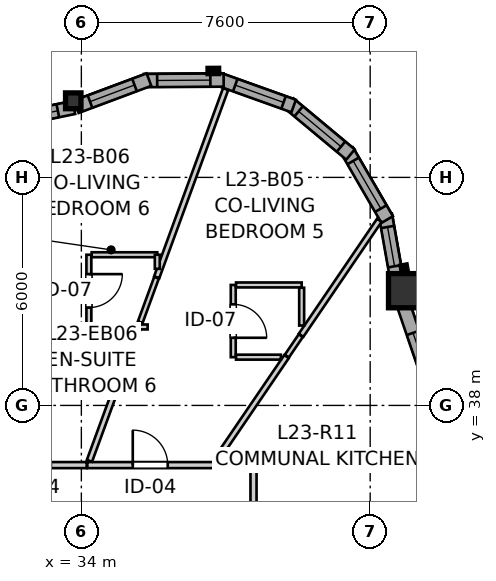
"""IFC4 building model, lengths in metres.
Left out: names, types, materials, properties, quantities, classifications, styles, units other than length and angle.
Written with IfcOpenShell. Run it as: python <this file> out.ifc"""

import sys

from ifc_helpers import new_model, si_unit, direction, frame, frame_2d, origin, origin_2d, place, context, subcontext, project, spatial, rectangle, i_section, extrude, source, transform, mapped, element, fill, save


model = new_model("IFC4")
c1 = context("Model", 3, precision=1e-05, world=origin(), true_north=direction((0.0, 1.0)))
c2 = subcontext(c1, "Body", "Model", "MODEL_VIEW")
j1 = project(units=[si_unit("LENGTHUNIT", "METRE"), si_unit("PLANEANGLEUNIT", "RADIAN")], contexts=[c1])
p1 = place(None, origin())
s1 = spatial("IfcSite", under=j1, at=p1, CompositionType="ELEMENT")
p2 = place(p1, origin())
s2 = spatial("IfcBuilding", under=s1, at=p2, CompositionType="ELEMENT")
p3 = place(p2, frame((0.0, 0.0, 80.0)))
s3 = spatial("IfcBuildingStorey", under=s2, at=p3, CompositionType="ELEMENT", Elevation=80.0)
m1 = source(origin(), c2, "Body", "SweptSolid", [
    extrude(rectangle(XDim=0.9, YDim=0.9, at=origin_2d()), origin(), (0.0, 0.0, 1.0), 2.935),
])
p4 = place(p3, frame((42.532, 41.019, 0.0), z_axis=(0.0, 0.0, 1.0), x_axis=(1.0, 0.0, 0.0)))
e1 = element("IfcColumn", 1, at=p4, inside=s3, PredefinedType="COLUMN", context=c2, shape_type="MappedRepresentation", body=[
    mapped(m1, transform((0.0, 0.0, 0.0), x_axis=(1.0, 0.0, 0.0), y_axis=(0.0, 1.0, 0.0), z_axis=(0.0, 0.0, 1.0), scale=1.0)),
])
m2 = source(origin(), c2, "Body", "SweptSolid", [
    extrude(i_section(OverallWidth=0.406, OverallDepth=0.416, WebThickness=0.027, FlangeThickness=0.044, FilletRadius=0.015, at=origin_2d()), origin(), (0.0, 0.0, 1.0), 2.935),
])
p5 = place(p3, frame((33.787, 46.015, 0.0), z_axis=(0.0, 0.0, 1.0), x_axis=(1.0, 0.0, 0.0)))
e2 = element("IfcColumn", 2, at=p5, inside=s3, PredefinedType="PILASTER", context=c2, shape_type="MappedRepresentation", body=[
    mapped(m2, transform((0.0, 0.0, 0.0), x_axis=(1.0, 0.0, 0.0), y_axis=(0.0, 1.0, 0.0), z_axis=(0.0, 0.0, 1.0), scale=1.0)),
])
p6 = place(p3, frame((43.406, 37.923, 0.0), z_axis=(0.0, 0.0, 1.0), x_axis=(-0.323597196737, 0.946194934601, 0.0)))
e3 = element("IfcWall", 3, at=p6, inside=s3, PredefinedType="SOLIDWALL", context=c2, shape_type="SweptSolid", body=[
    extrude(rectangle(XDim=2.988, YDim=0.35, at=frame_2d((1.494, 0.0))), origin(), (0.0, 0.0, 1.0), 2.465),
])
p7 = place(p6, frame((0.899, 0.0, 0.82)))
e4 = element("IfcOpeningElement", 4, at=p7, cuts=e3, PredefinedType="OPENING", context=c2, shape_type="SweptSolid", body=[
    extrude(rectangle(XDim=1.2, YDim=1.45, at=frame_2d((0.6, 0.725))), frame((0.0, 0.185, 0.0), z_axis=(0.0, -1.0, 0.0), x_axis=(1.0, 0.0, 0.0)), (0.0, 0.0, 1.0), 0.37),
])
p8 = place(p3, frame((42.321, 41.21, 0.0), z_axis=(0.0, 0.0, 1.0), x_axis=(-0.174331490339, 0.984687022092, 0.0)))
e5 = element("IfcWall", 5, at=p8, inside=s3, PredefinedType="SOLIDWALL", context=c2, shape_type="SweptSolid", body=[
    extrude(rectangle(XDim=1.836, YDim=0.35, at=frame_2d((0.918, 0.0))), origin(), (0.0, 0.0, 1.0), 2.465),
])
p9 = place(p8, frame((0.458, 0.0, 0.82)))
e6 = element("IfcOpeningElement", 6, at=p9, cuts=e5, PredefinedType="OPENING", context=c2, shape_type="SweptSolid", body=[
    extrude(rectangle(XDim=1.05, YDim=1.45, at=frame_2d((0.525, 0.725))), frame((0.0, 0.185, 0.0), z_axis=(0.0, -1.0, 0.0), x_axis=(1.0, 0.0, 0.0)), (0.0, 0.0, 1.0), 0.37),
])
p10 = place(p3, frame((42.047, 42.89, 0.0), z_axis=(0.0, 0.0, 1.0), x_axis=(-0.501902596059, 0.864924149315, 0.0)))
e7 = element("IfcWall", 7, at=p10, inside=s3, PredefinedType="SOLIDWALL", context=c2, shape_type="SweptSolid", body=[
    extrude(rectangle(XDim=2.099, YDim=0.35, at=frame_2d((1.049, 0.0))), origin(), (0.0, 0.0, 1.0), 2.465),
])
p11 = place(p10, frame((0.333, 0.0, 0.82)))
e8 = element("IfcOpeningElement", 8, at=p11, cuts=e7, PredefinedType="OPENING", context=c2, shape_type="SweptSolid", body=[
    extrude(rectangle(XDim=1.45, YDim=1.25, at=frame_2d((0.725, 0.625))), frame((0.0, 0.185, 0.0), z_axis=(0.0, -1.0, 0.0), x_axis=(1.0, 0.0, 0.0)), (0.0, 0.0, 1.0), 0.37),
])
p12 = place(p3, frame((41.082, 44.602, 0.0), z_axis=(0.0, 0.0, 1.0), x_axis=(-0.768497696041, 0.639852554249, 0.0)))
e9 = element("IfcWall", 9, at=p12, inside=s3, PredefinedType="SOLIDWALL", context=c2, shape_type="SweptSolid", body=[
    extrude(rectangle(XDim=2.099, YDim=0.35, at=frame_2d((1.049, 0.0))), origin(), (0.0, 0.0, 1.0), 2.465),
])
p13 = place(p12, frame((0.324, 0.0, 0.82)))
e10 = element("IfcOpeningElement", 10, at=p13, cuts=e9, PredefinedType="OPENING", context=c2, shape_type="SweptSolid", body=[
    extrude(rectangle(XDim=1.45, YDim=1.25, at=frame_2d((0.725, 0.625))), frame((0.0, 0.185, 0.0), z_axis=(0.0, -1.0, 0.0), x_axis=(1.0, 0.0, 0.0)), (0.0, 0.0, 1.0), 0.37),
])
p14 = place(p3, frame((39.586, 45.877, 0.0), z_axis=(0.0, 0.0, 1.0), x_axis=(-0.941473186867, 0.33708787936, 0.0)))
e11 = element("IfcWall", 11, at=p14, inside=s3, PredefinedType="SOLIDWALL", context=c2, shape_type="SweptSolid", body=[
    extrude(rectangle(XDim=2.099, YDim=0.35, at=frame_2d((1.049, 0.0))), origin(), (0.0, 0.0, 1.0), 2.465),
])
p15 = place(p14, frame((0.283, 0.0, 0.82)))
e12 = element("IfcOpeningElement", 12, at=p15, cuts=e11, PredefinedType="OPENING", context=c2, shape_type="SweptSolid", body=[
    extrude(rectangle(XDim=1.35, YDim=1.45, at=frame_2d((0.675, 0.725))), frame((0.0, 0.185, 0.0), z_axis=(0.0, -1.0, 0.0), x_axis=(1.0, 0.0, 0.0)), (0.0, 0.0, 1.0), 0.37),
])
p16 = place(p3, frame((37.744, 46.562, 0.0), z_axis=(0.0, 0.0, 1.0), x_axis=(-0.999976451414, -0.006862697526, 0.0)))
e13 = element("IfcWall", 13, at=p16, inside=s3, PredefinedType="SOLIDWALL", context=c2, shape_type="SweptSolid", body=[
    extrude(rectangle(XDim=2.099, YDim=0.35, at=frame_2d((1.049, 0.0))), origin(), (0.0, 0.0, 1.0), 2.465),
])
p17 = place(p16, frame((0.35, 0.0, 0.82)))
e14 = element("IfcOpeningElement", 14, at=p17, cuts=e13, PredefinedType="OPENING", context=c2, shape_type="SweptSolid", body=[
    extrude(rectangle(XDim=1.4, YDim=1.35, at=frame_2d((0.7, 0.675))), frame((0.0, 0.185, 0.0), z_axis=(0.0, -1.0, 0.0), x_axis=(1.0, 0.0, 0.0)), (0.0, 0.0, 1.0), 0.37),
])
p18 = place(p3, frame((35.779, 46.573, 0.0), z_axis=(0.0, 0.0, 1.0), x_axis=(-0.9368002254, -0.349864741994, 0.0)))
e15 = element("IfcWall", 15, at=p18, inside=s3, PredefinedType="SOLIDWALL", context=c2, shape_type="SweptSolid", body=[
    extrude(rectangle(XDim=2.041, YDim=0.35, at=frame_2d((1.021, 0.0))), origin(), (0.0, 0.0, 1.0), 2.465),
])
p19 = place(p18, frame((0.406, 0.0, 0.82)))
e16 = element("IfcOpeningElement", 16, at=p19, cuts=e15, PredefinedType="OPENING", context=c2, shape_type="SweptSolid", body=[
    extrude(rectangle(XDim=1.25, YDim=1.35, at=frame_2d((0.625, 0.675))), frame((0.0, 0.185, 0.0), z_axis=(0.0, -1.0, 0.0), x_axis=(1.0, 0.0, 0.0)), (0.0, 0.0, 1.0), 0.37),
])
p20 = place(p3, frame((33.803, 45.84, 0.0), z_axis=(0.0, 0.0, 1.0), x_axis=(-0.97943222174, -0.201773444777, 0.0)))
e17 = element("IfcWall", 17, at=p20, inside=s3, PredefinedType="SOLIDWALL", context=c2, shape_type="SweptSolid", body=[
    extrude(rectangle(XDim=3.144, YDim=0.35, at=frame_2d((1.572, 0.0))), origin(), (0.0, 0.0, 1.0), 2.465),
])
p21 = place(p20, frame((0.431, 0.0, 0.82)))
e18 = element("IfcOpeningElement", 18, at=p21, cuts=e17, PredefinedType="OPENING", context=c2, shape_type="SweptSolid", body=[
    extrude(rectangle(XDim=0.95, YDim=1.35, at=frame_2d((0.475, 0.675))), frame((0.0, 0.185, 0.0), z_axis=(0.0, -1.0, 0.0), x_axis=(1.0, 0.0, 0.0)), (0.0, 0.0, 1.0), 0.37),
])
p22 = place(p20, frame((1.933, 0.0, 0.82)))
e19 = element("IfcOpeningElement", 19, at=p22, cuts=e17, PredefinedType="OPENING", context=c2, shape_type="SweptSolid", body=[
    extrude(rectangle(XDim=0.95, YDim=1.35, at=frame_2d((0.475, 0.675))), frame((0.0, 0.185, 0.0), z_axis=(0.0, -1.0, 0.0), x_axis=(1.0, 0.0, 0.0)), (0.0, 0.0, 1.0), 0.37),
])
p23 = place(p3, frame((38.53, 36.43, 0.0), z_axis=(0.0, 0.0, 1.0), x_axis=(0.0, -1.0, 0.0)))
e20 = element("IfcWall", 20, at=p23, inside=s3, PredefinedType="PARTITIONING", context=c2, shape_type="SweptSolid", body=[
    extrude(rectangle(XDim=4.559, YDim=0.16, at=frame_2d((2.279, 0.0))), origin(), (0.0, 0.0, 1.0), 2.573),
])
p24 = place(p23, frame((1.646, 0.0, 0.0)))
e21 = element("IfcOpeningElement", 21, at=p24, cuts=e20, PredefinedType="OPENING", context=c2, shape_type="SweptSolid", body=[
    extrude(rectangle(XDim=1.3, YDim=2.1, at=frame_2d((0.65, 1.05))), frame((0.0, 0.09, 0.0), z_axis=(0.0, -1.0, 0.0), x_axis=(1.0, 0.0, 0.0)), (0.0, 0.0, 1.0), 0.18),
])
p25 = place(p3, frame((34.156, 36.43, 0.0), z_axis=(0.0, 0.0, 1.0), x_axis=(1.0, 0.0, 0.0)))
e22 = element("IfcWall", 22, at=p25, inside=s3, PredefinedType="PARTITIONING", context=c2, shape_type="SweptSolid", body=[
    extrude(rectangle(XDim=3.316, YDim=0.16, at=frame_2d((1.658, 0.0))), origin(), (0.0, 0.0, 1.0), 2.935),
])
p26 = place(p25, frame((1.197, 0.0, 0.0)))
e23 = element("IfcOpeningElement", 23, at=p26, cuts=e22, PredefinedType="OPENING", context=c2, shape_type="SweptSolid", body=[
    extrude(rectangle(XDim=0.92, YDim=2.1, at=frame_2d((0.46, 1.05))), frame((0.0, 0.09, 0.0), z_axis=(0.0, -1.0, 0.0), x_axis=(1.0, 0.0, 0.0)), (0.0, 0.0, 1.0), 0.18),
])
p27 = place(p3, frame((31.335, 36.43, 0.0), z_axis=(0.0, 0.0, 1.0), x_axis=(1.0, 0.0, 0.0)))
e24 = element("IfcWall", 24, at=p27, inside=s3, PredefinedType="PARTITIONING", context=c2, shape_type="SweptSolid", body=[
    extrude(rectangle(XDim=2.806, YDim=0.16, at=frame_2d((1.403, 0.0))), origin(), (0.0, 0.0, 1.0), 2.935),
])
p28 = place(p27, frame((0.944, 0.0, 0.0)))
e25 = element("IfcOpeningElement", 25, at=p28, cuts=e24, PredefinedType="OPENING", context=c2, shape_type="SweptSolid", body=[
    extrude(rectangle(XDim=0.92, YDim=2.1, at=frame_2d((0.46, 1.05))), frame((0.0, 0.09, 0.0), z_axis=(0.0, -1.0, 0.0), x_axis=(1.0, 0.0, 0.0)), (0.0, 0.0, 1.0), 0.18),
])
p29 = place(p3, frame((34.198, 41.965, 0.0), z_axis=(0.0, 0.0, 1.0), x_axis=(0.0, -1.0, 0.0)))
e26 = element("IfcWall", 26, at=p29, inside=s3, PredefinedType="PARTITIONING", context=c2, shape_type="SweptSolid", body=[
    extrude(rectangle(XDim=1.827, YDim=0.13, at=frame_2d((0.914, 0.0))), origin(), (0.0, 0.0, 1.0), 2.935),
])
p30 = place(p29, frame((0.51, 0.0, 0.0)))
e27 = element("IfcOpeningElement", 27, at=p30, cuts=e26, PredefinedType="OPENING", context=c2, shape_type="SweptSolid", body=[
    extrude(rectangle(XDim=0.88, YDim=2.05, at=frame_2d((0.44, 1.025))), frame((0.0, 0.075, 0.0), z_axis=(0.0, -1.0, 0.0), x_axis=(1.0, 0.0, 0.0)), (0.0, 0.0, 1.0), 0.15),
])
p31 = place(p3, frame((37.997, 41.17, 0.0), z_axis=(0.0, 0.0, 1.0), x_axis=(0.0, -1.0, 0.0)))
e28 = element("IfcWall", 28, at=p31, inside=s3, PredefinedType="PARTITIONING", context=c2, shape_type="SweptSolid", body=[
    extrude(rectangle(XDim=1.9, YDim=0.13, at=frame_2d((0.95, 0.0))), origin(), (0.0, 0.0, 1.0), 2.935),
])
p32 = place(p31, frame((0.51, 0.0, 0.0)))
e29 = element("IfcOpeningElement", 29, at=p32, cuts=e28, PredefinedType="OPENING", context=c2, shape_type="SweptSolid", body=[
    extrude(rectangle(XDim=0.88, YDim=2.05, at=frame_2d((0.44, 1.025))), frame((0.0, 0.075, 0.0), z_axis=(0.0, -1.0, 0.0), x_axis=(1.0, 0.0, 0.0)), (0.0, 0.0, 1.0), 0.15),
])
p33 = place(p3, frame((38.659, 31.93, 0.0), z_axis=(0.0, 0.0, 1.0), x_axis=(0.813936175568, 0.580954302938, 0.0)))
e30 = element("IfcWall", 30, at=p33, inside=s3, PredefinedType="PARTITIONING", context=c2, shape_type="SweptSolid", body=[
    extrude(rectangle(XDim=6.346, YDim=0.145, at=frame_2d((3.173, 0.0))), origin(), (0.0, 0.0, 1.0), 2.935),
])
p34 = place(p3, frame((35.983, 41.373, 0.0), z_axis=(0.0, 0.0, 1.0), x_axis=(0.343972978133, 0.938979547335, 0.0)))
e31 = element("IfcWall", 31, at=p34, inside=s3, PredefinedType="PARTITIONING", context=c2, shape_type="SweptSolid", body=[
    extrude(rectangle(XDim=5.272, YDim=0.145, at=frame_2d((2.636, 0.0))), origin(), (0.0, 0.0, 1.0), 2.935),
])
p35 = place(p3, frame((34.213, 36.542, 0.0), z_axis=(0.0, 0.0, 1.0), x_axis=(0.343978558693, 0.93897750301, 0.0)))
e32 = element("IfcWall", 32, at=p35, inside=s3, PredefinedType="PARTITIONING", context=c2, shape_type="SweptSolid", body=[
    extrude(rectangle(XDim=3.664, YDim=0.145, at=frame_2d((1.832, 0.0))), origin(), (0.0, 0.0, 1.0), 2.935),
])
p36 = place(p3, frame((39.782, 39.847, 0.0), z_axis=(0.0, 0.0, 1.0), x_axis=(0.562744405359, 0.826630954077, 0.0)))
e33 = element("IfcWall", 33, at=p36, inside=s3, PredefinedType="PARTITIONING", context=c2, shape_type="SweptSolid", body=[
    extrude(rectangle(XDim=3.658, YDim=0.145, at=frame_2d((1.829, 0.0))), origin(), (0.0, 0.0, 1.0), 2.935),
])
p37 = place(p3, frame((37.541, 36.557, 0.0), z_axis=(0.0, 0.0, 1.0), x_axis=(0.563020017907, 0.826443258449, 0.0)))
e34 = element("IfcWall", 34, at=p37, inside=s3, PredefinedType="PARTITIONING", context=c2, shape_type="SweptSolid", body=[
    extrude(rectangle(XDim=3.3, YDim=0.145, at=frame_2d((1.65, 0.0))), origin(), (0.0, 0.0, 1.0), 2.935),
])
p38 = place(p3, frame((38.07, 41.17, 0.0), z_axis=(0.0, 0.0, 1.0), x_axis=(1.0, 0.0, 0.0)))
e35 = element("IfcWall", 35, at=p38, inside=s3, PredefinedType="PARTITIONING", context=c2, shape_type="SweptSolid", body=[
    extrude(rectangle(XDim=1.727, YDim=0.13, at=frame_2d((0.864, 0.0))), origin(), (0.0, 0.0, 1.0), 2.935),
])
p39 = place(p3, frame((34.271, 41.965, 0.0), z_axis=(0.0, 0.0, 1.0), x_axis=(1.0, 0.0, 0.0)))
e36 = element("IfcWall", 36, at=p39, inside=s3, PredefinedType="PARTITIONING", context=c2, shape_type="SweptSolid", body=[
    extrude(rectangle(XDim=1.727, YDim=0.13, at=frame_2d((0.864, 0.0))), origin(), (0.0, 0.0, 1.0), 2.103),
])
p40 = place(p3, frame((38.07, 39.27, 0.0), z_axis=(0.0, 0.0, 1.0), x_axis=(1.0, 0.0, 0.0)))
e37 = element("IfcWall", 37, at=p40, inside=s3, PredefinedType="PARTITIONING", context=c2, shape_type="SweptSolid", body=[
    extrude(rectangle(XDim=1.179, YDim=0.13, at=frame_2d((0.589, 0.0))), origin(), (0.0, 0.0, 1.0), 2.935),
])
p41 = place(p3, frame((35.549, 40.189, 0.0), z_axis=(0.0, 0.0, 1.0), x_axis=(0.344070409158, 0.938943850048, 0.0)))
e38 = element("IfcWall", 38, at=p41, inside=s3, PredefinedType="PARTITIONING", context=c2, shape_type="SweptSolid", body=[
    extrude(rectangle(XDim=1.246, YDim=0.13, at=frame_2d((0.623, 0.0))), origin(), (0.0, 0.0, 1.0), 2.935),
])
p42 = place(p3, frame((33.958, 40.065, 0.0), z_axis=(0.0, 0.0, 1.0), x_axis=(1.0, 0.0, 0.0)))
e39 = element("IfcWall", 39, at=p42, inside=s3, PredefinedType="PARTITIONING", context=c2, shape_type="SweptSolid", body=[
    extrude(rectangle(XDim=1.786, YDim=0.13, at=frame_2d((0.893, 0.0))), origin(), (0.0, 0.0, 1.0), 2.935),
])
p43 = place(p3, frame((39.797, 40.101, 0.0), z_axis=(0.0, 0.0, 1.0), x_axis=(0.0, 1.0, 0.0)))
e40 = element("IfcWall", 40, at=p43, inside=s3, PredefinedType="PARTITIONING", context=c2, shape_type="SweptSolid", body=[
    extrude(rectangle(XDim=0.996, YDim=0.13, at=frame_2d((0.498, 0.0))), origin(), (0.0, 0.0, 1.0), 2.935),
])
p44 = place(p3, frame((37.637, 36.43, 0.0), z_axis=(0.0, 0.0, 1.0), x_axis=(1.0, 0.0, 0.0)))
e41 = element("IfcWall", 41, at=p44, inside=s3, PredefinedType="PARTITIONING", context=c2, shape_type="SweptSolid", body=[
    extrude(rectangle(XDim=0.805, YDim=0.16, at=frame_2d((0.402, 0.0))), origin(), (0.0, 0.0, 1.0), 2.935),
])
p45 = place(p3, frame((39.408, 39.297, 0.0), z_axis=(0.0, 0.0, 1.0), x_axis=(0.562042989861, 0.827108020483, 0.0)))
e42 = element("IfcWall", 42, at=p45, inside=s3, PredefinedType="PARTITIONING", context=c2, shape_type="SweptSolid", body=[
    extrude(rectangle(XDim=0.65, YDim=0.13, at=frame_2d((0.325, 0.0))), origin(), (0.0, 0.0, 1.0), 2.935),
])
p46 = place(p3, frame((35.998, 41.594, 0.0), z_axis=(0.0, 0.0, 1.0), x_axis=(0.0, 1.0, 0.0)))
e43 = element("IfcWall", 43, at=p46, inside=s3, PredefinedType="PARTITIONING", context=c2, shape_type="SweptSolid", body=[
    extrude(rectangle(XDim=0.371, YDim=0.13, at=frame_2d((0.186, 0.0))), origin(), (0.0, 0.0, 1.0), 2.935),
])
m3 = source(origin(), c2, "Body", "SweptSolid", [
    extrude(rectangle(XDim=1.2, YDim=1.45, at=frame_2d((0.6, 0.725))), frame((0.0, 0.03, 0.0), z_axis=(0.0, -1.0, 0.0), x_axis=(1.0, 0.0, 0.0)), (0.0, 0.0, 1.0), 0.06),
])
p47 = place(p7, origin())
e44 = element("IfcWindow", 44, at=p47, inside=s3, PartitioningType="SINGLE_PANEL", PredefinedType="WINDOW", context=c2, shape_type="MappedRepresentation", body=[
    mapped(m3, transform((0.0, 0.0, 0.0), x_axis=(1.0, 0.0, 0.0), y_axis=(0.0, 1.0, 0.0), z_axis=(0.0, 0.0, 1.0), scale=1.0)),
])
fill(e4, e44)
m4 = source(origin(), c2, "Body", "SweptSolid", [
    extrude(rectangle(XDim=1.05, YDim=1.45, at=frame_2d((0.525, 0.725))), frame((0.0, 0.03, 0.0), z_axis=(0.0, -1.0, 0.0), x_axis=(1.0, 0.0, 0.0)), (0.0, 0.0, 1.0), 0.06),
])
p48 = place(p9, origin())
e45 = element("IfcWindow", 45, at=p48, inside=s3, PartitioningType="SINGLE_PANEL", PredefinedType="WINDOW", context=c2, shape_type="MappedRepresentation", body=[
    mapped(m4, transform((0.0, 0.0, 0.0), x_axis=(1.0, 0.0, 0.0), y_axis=(0.0, 1.0, 0.0), z_axis=(0.0, 0.0, 1.0), scale=1.0)),
])
fill(e6, e45)
m5 = source(origin(), c2, "Body", "SweptSolid", [
    extrude(rectangle(XDim=1.45, YDim=1.25, at=frame_2d((0.725, 0.625))), frame((0.0, 0.03, 0.0), z_axis=(0.0, -1.0, 0.0), x_axis=(1.0, 0.0, 0.0)), (0.0, 0.0, 1.0), 0.06),
])
p49 = place(p11, origin())
e46 = element("IfcWindow", 46, at=p49, inside=s3, PartitioningType="SINGLE_PANEL", PredefinedType="WINDOW", context=c2, shape_type="MappedRepresentation", body=[
    mapped(m5, transform((0.0, 0.0, 0.0), x_axis=(1.0, 0.0, 0.0), y_axis=(0.0, 1.0, 0.0), z_axis=(0.0, 0.0, 1.0), scale=1.0)),
])
fill(e8, e46)
p50 = place(p13, origin())
e47 = element("IfcWindow", 47, at=p50, inside=s3, PartitioningType="SINGLE_PANEL", PredefinedType="WINDOW", context=c2, shape_type="MappedRepresentation", body=[
    mapped(m5, transform((0.0, 0.0, 0.0), x_axis=(1.0, 0.0, 0.0), y_axis=(0.0, 1.0, 0.0), z_axis=(0.0, 0.0, 1.0), scale=1.0)),
])
fill(e10, e47)
m6 = source(origin(), c2, "Body", "SweptSolid", [
    extrude(rectangle(XDim=1.35, YDim=1.45, at=frame_2d((0.675, 0.725))), frame((0.0, 0.03, 0.0), z_axis=(0.0, -1.0, 0.0), x_axis=(1.0, 0.0, 0.0)), (0.0, 0.0, 1.0), 0.06),
])
p51 = place(p15, origin())
e48 = element("IfcWindow", 48, at=p51, inside=s3, PartitioningType="SINGLE_PANEL", PredefinedType="WINDOW", context=c2, shape_type="MappedRepresentation", body=[
    mapped(m6, transform((0.0, 0.0, 0.0), x_axis=(1.0, 0.0, 0.0), y_axis=(0.0, 1.0, 0.0), z_axis=(0.0, 0.0, 1.0), scale=1.0)),
])
fill(e12, e48)
m7 = source(origin(), c2, "Body", "SweptSolid", [
    extrude(rectangle(XDim=1.4, YDim=1.35, at=frame_2d((0.7, 0.675))), frame((0.0, 0.03, 0.0), z_axis=(0.0, -1.0, 0.0), x_axis=(1.0, 0.0, 0.0)), (0.0, 0.0, 1.0), 0.06),
])
p52 = place(p17, origin())
e49 = element("IfcWindow", 49, at=p52, inside=s3, PartitioningType="SINGLE_PANEL", PredefinedType="WINDOW", context=c2, shape_type="MappedRepresentation", body=[
    mapped(m7, transform((0.0, 0.0, 0.0), x_axis=(1.0, 0.0, 0.0), y_axis=(0.0, 1.0, 0.0), z_axis=(0.0, 0.0, 1.0), scale=1.0)),
])
fill(e14, e49)
m8 = source(origin(), c2, "Body", "SweptSolid", [
    extrude(rectangle(XDim=1.25, YDim=1.35, at=frame_2d((0.625, 0.675))), frame((0.0, 0.03, 0.0), z_axis=(0.0, -1.0, 0.0), x_axis=(1.0, 0.0, 0.0)), (0.0, 0.0, 1.0), 0.06),
])
p53 = place(p19, origin())
e50 = element("IfcWindow", 50, at=p53, inside=s3, PartitioningType="SINGLE_PANEL", PredefinedType="WINDOW", context=c2, shape_type="MappedRepresentation", body=[
    mapped(m8, transform((0.0, 0.0, 0.0), x_axis=(1.0, 0.0, 0.0), y_axis=(0.0, 1.0, 0.0), z_axis=(0.0, 0.0, 1.0), scale=1.0)),
])
fill(e16, e50)
m9 = source(origin(), c2, "Body", "SweptSolid", [
    extrude(rectangle(XDim=0.95, YDim=1.35, at=frame_2d((0.475, 0.675))), frame((0.0, 0.03, 0.0), z_axis=(0.0, -1.0, 0.0), x_axis=(1.0, 0.0, 0.0)), (0.0, 0.0, 1.0), 0.06),
])
p54 = place(p21, origin())
e51 = element("IfcWindow", 51, at=p54, inside=s3, PartitioningType="SINGLE_PANEL", PredefinedType="WINDOW", context=c2, shape_type="MappedRepresentation", body=[
    mapped(m9, transform((0.0, 0.0, 0.0), x_axis=(1.0, 0.0, 0.0), y_axis=(0.0, 1.0, 0.0), z_axis=(0.0, 0.0, 1.0), scale=1.0)),
])
fill(e18, e51)
m10 = source(origin(), c2, "Body", "SweptSolid", [
    extrude(rectangle(XDim=0.92, YDim=2.1, at=frame_2d((0.46, 1.05))), frame((0.0, 0.025, 0.0), z_axis=(0.0, -1.0, 0.0), x_axis=(1.0, 0.0, 0.0)), (0.0, 0.0, 1.0), 0.05),
])
p55 = place(p26, origin())
e52 = element("IfcDoor", 52, at=p55, inside=s3, OperationType="SINGLE_SWING_LEFT", PredefinedType="DOOR", context=c2, shape_type="MappedRepresentation", body=[
    mapped(m10, transform((0.0, 0.0, 0.0), x_axis=(1.0, 0.0, 0.0), y_axis=(0.0, 1.0, 0.0), z_axis=(0.0, 0.0, 1.0), scale=1.0)),
])
fill(e23, e52)
m11 = source(origin(), c2, "Body", "SweptSolid", [
    extrude(rectangle(XDim=0.88, YDim=2.05, at=frame_2d((0.44, 1.025))), frame((0.0, 0.025, 0.0), z_axis=(0.0, -1.0, 0.0), x_axis=(1.0, 0.0, 0.0)), (0.0, 0.0, 1.0), 0.05),
])
p56 = place(p30, origin())
e53 = element("IfcDoor", 53, at=p56, inside=s3, OperationType="SINGLE_SWING_LEFT", PredefinedType="DOOR", context=c2, shape_type="MappedRepresentation", body=[
    mapped(m11, transform((0.0, 0.0, 0.0), x_axis=(1.0, 0.0, 0.0), y_axis=(0.0, 1.0, 0.0), z_axis=(0.0, 0.0, 1.0), scale=1.0)),
])
fill(e27, e53)
p57 = place(p32, origin())
e54 = element("IfcDoor", 54, at=p57, inside=s3, OperationType="SINGLE_SWING_RIGHT", PredefinedType="DOOR", context=c2, shape_type="MappedRepresentation", body=[
    mapped(m11, transform((0.0, 0.0, 0.0), x_axis=(1.0, 0.0, 0.0), y_axis=(0.0, 1.0, 0.0), z_axis=(0.0, 0.0, 1.0), scale=1.0)),
])
fill(e29, e54)
save(model, sys.argv[1])
